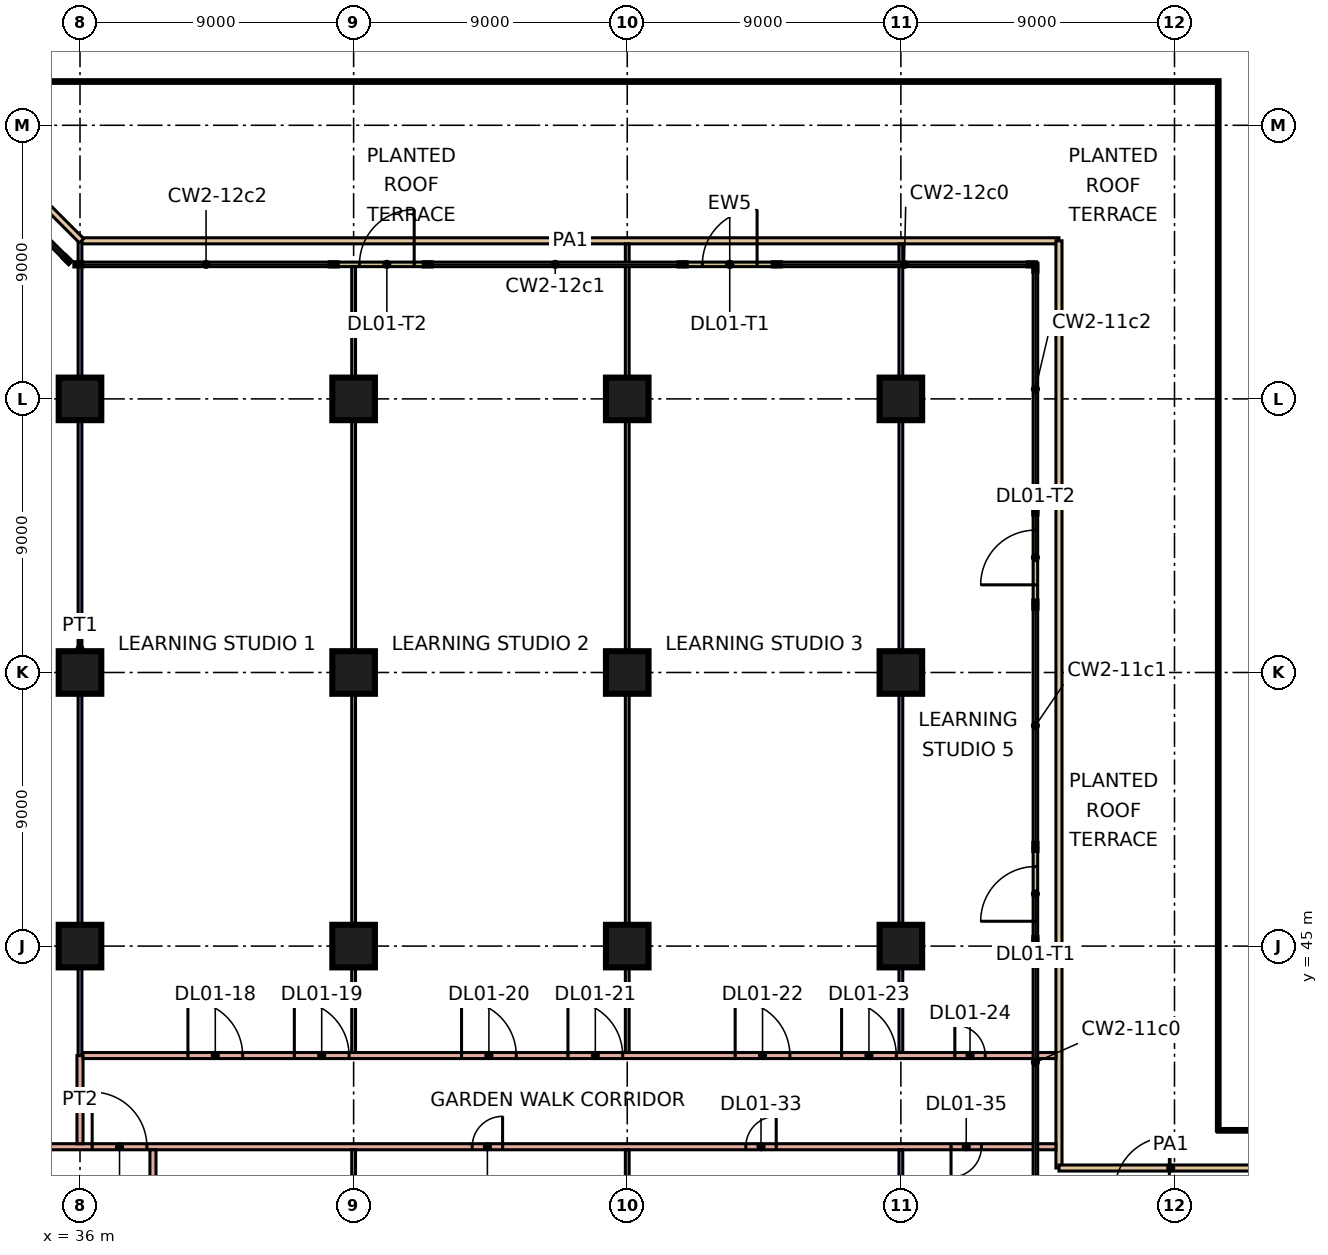
"""IFC4 building model, lengths in metres.
Left out: names, types, materials, properties, quantities, classifications, styles, units other than length and angle.
Written with IfcOpenShell. Run it as: python <this file> out.ifc"""

import sys

from ifc_helpers import new_model, si_unit, direction, frame, frame_2d, origin, origin_2d, place, context, subcontext, project, spatial, rectangle, extrude, element, fill, save


model = new_model("IFC4")
c1 = context("Model", 3, precision=1e-05, world=origin(), true_north=direction((0.0, 1.0)))
c2 = subcontext(c1, "Body", "Model", "MODEL_VIEW")
j1 = project(units=[si_unit("LENGTHUNIT", "METRE"), si_unit("PLANEANGLEUNIT", "RADIAN")], contexts=[c1])
p1 = place(None, origin())
s1 = spatial("IfcSite", under=j1, at=p1, CompositionType="ELEMENT")
p2 = place(p1, origin())
s2 = spatial("IfcBuilding", under=s1, at=p2, CompositionType="ELEMENT")
p3 = place(p2, frame((0.0, 0.0, 7.2)))
s3 = spatial("IfcBuildingStorey", under=s2, at=p3, CompositionType="ELEMENT", Elevation=7.2)
for number, where, z_axis, x_axis in (
    (1, (36.0, 45.0, 0.0), (0.0, 0.0, 1.0), (1.0, 0.0, 0.0)),
    (2, (45.0, 45.0, 0.0), (0.0, 0.0, 1.0), (1.0, 0.0, 0.0)),
    (3, (54.0, 45.0, 0.0), (0.0, 0.0, 1.0), (1.0, 0.0, 0.0)),
    (4, (63.0, 45.0, 0.0), (0.0, 0.0, 1.0), (1.0, 0.0, 0.0)),
    (5, (36.0, 54.0, 0.0), (0.0, 0.0, 1.0), (1.0, 0.0, 0.0)),
    (6, (45.0, 54.0, 0.0), (0.0, 0.0, 1.0), (1.0, 0.0, 0.0)),
    (7, (54.0, 54.0, 0.0), (0.0, 0.0, 1.0), (1.0, 0.0, 0.0)),
    (8, (63.0, 54.0, 0.0), (0.0, 0.0, 1.0), (1.0, 0.0, 0.0)),
    (9, (36.0, 63.0, 0.0), (0.0, 0.0, 1.0), (1.0, 0.0, 0.0)),
    (10, (45.0, 63.0, 0.0), (0.0, 0.0, 1.0), (1.0, 0.0, 0.0)),
    (11, (54.0, 63.0, 0.0), (0.0, 0.0, 1.0), (1.0, 0.0, 0.0)),
    (12, (63.0, 63.0, 0.0), (0.0, 0.0, 1.0), (1.0, 0.0, 0.0)),
):
    element("IfcColumn", number, at=place(p3, frame(where, z_axis=z_axis, x_axis=x_axis)), inside=s3, PredefinedType="COLUMN", context=c2, shape_type="SweptSolid", body=[
        extrude(rectangle(XDim=1.4, YDim=1.4, at=origin_2d()), origin(), (0.0, 0.0, 1.0), 4.8),
    ])
p4 = place(p3, frame((67.425, 45.217, 0.0), z_axis=(0.0, 0.0, 1.0), x_axis=(0.0, 1.0, 0.0)))
e13 = element("IfcWall", 13, at=p4, inside=s3, PredefinedType="SOLIDWALL", context=c2, shape_type="SweptSolid", body=[
    extrude(rectangle(XDim=3.0, YDim=0.15, at=frame_2d((1.5, 0.0))), origin(), (0.0, 0.0, 1.0), 4.4),
])
p5 = place(p4, frame((0.6, 0.0, 0.0)))
e14 = element("IfcOpeningElement", 14, at=p5, cuts=e13, PredefinedType="OPENING", context=c2, shape_type="SweptSolid", body=[
    extrude(rectangle(XDim=1.8, YDim=2.4, at=frame_2d((0.9, 1.2))), frame((0.0, 0.085, 0.0), z_axis=(0.0, -1.0, 0.0), x_axis=(1.0, 0.0, 0.0)), (0.0, 0.0, 1.0), 0.17),
])
p6 = place(p3, frame((67.425, 56.283, 0.0), z_axis=(0.0, 0.0, 1.0), x_axis=(0.0, 1.0, 0.0)))
e15 = element("IfcWall", 15, at=p6, inside=s3, PredefinedType="SOLIDWALL", context=c2, shape_type="SweptSolid", body=[
    extrude(rectangle(XDim=3.0, YDim=0.15, at=frame_2d((1.5, 0.0))), origin(), (0.0, 0.0, 1.0), 4.4),
])
p7 = place(p6, frame((0.6, 0.0, 0.0)))
e16 = element("IfcOpeningElement", 16, at=p7, cuts=e15, PredefinedType="OPENING", context=c2, shape_type="SweptSolid", body=[
    extrude(rectangle(XDim=1.8, YDim=2.4, at=frame_2d((0.9, 1.2))), frame((0.0, 0.085, 0.0), z_axis=(0.0, -1.0, 0.0), x_axis=(1.0, 0.0, 0.0)), (0.0, 0.0, 1.0), 0.17),
])
p8 = place(p3, frame((58.871, 67.425, 0.0), z_axis=(0.0, 0.0, 1.0), x_axis=(-1.0, 0.0, 0.0)))
e17 = element("IfcWall", 17, at=p8, inside=s3, PredefinedType="SOLIDWALL", context=c2, shape_type="SweptSolid", body=[
    extrude(rectangle(XDim=3.0, YDim=0.15, at=frame_2d((1.5, 0.0))), origin(), (0.0, 0.0, 1.0), 4.4),
])
p9 = place(p8, frame((0.6, 0.0, 0.0)))
e18 = element("IfcOpeningElement", 18, at=p9, cuts=e17, PredefinedType="OPENING", context=c2, shape_type="SweptSolid", body=[
    extrude(rectangle(XDim=1.8, YDim=2.4, at=frame_2d((0.9, 1.2))), frame((0.0, 0.085, 0.0), z_axis=(0.0, -1.0, 0.0), x_axis=(1.0, 0.0, 0.0)), (0.0, 0.0, 1.0), 0.17),
])
p10 = place(p3, frame((47.392, 67.425, 0.0), z_axis=(0.0, 0.0, 1.0), x_axis=(-1.0, 0.0, 0.0)))
e19 = element("IfcWall", 19, at=p10, inside=s3, PredefinedType="SOLIDWALL", context=c2, shape_type="SweptSolid", body=[
    extrude(rectangle(XDim=3.0, YDim=0.15, at=frame_2d((1.5, 0.0))), origin(), (0.0, 0.0, 1.0), 4.4),
])
p11 = place(p10, frame((0.4, 0.0, 0.0)))
e20 = element("IfcOpeningElement", 20, at=p11, cuts=e19, PredefinedType="OPENING", context=c2, shape_type="SweptSolid", body=[
    extrude(rectangle(XDim=1.8, YDim=2.4, at=frame_2d((0.9, 1.2))), frame((0.0, 0.085, 0.0), z_axis=(0.0, -1.0, 0.0), x_axis=(1.0, 0.0, 0.0)), (0.0, 0.0, 1.0), 0.17),
])
p12 = place(p3, frame((36.053, 68.2, 0.0), z_axis=(0.0, 0.0, 1.0), x_axis=(1.0, 0.0, 0.0)))
e21 = element("IfcWall", 21, at=p12, inside=s3, PredefinedType="PARAPET", context=c2, shape_type="SweptSolid", body=[
    extrude(rectangle(XDim=32.146, YDim=0.2, at=frame_2d((16.073, 0.0))), origin(), (0.0, 0.0, 1.0), 0.5),
])
p13 = place(p3, frame((68.2, 68.2, 0.0), z_axis=(0.0, 0.0, 1.0), x_axis=(0.0, -1.0, 0.0)))
e22 = element("IfcWall", 22, at=p13, inside=s3, PredefinedType="PARAPET", context=c2, shape_type="SweptSolid", body=[
    extrude(rectangle(XDim=30.5, YDim=0.2, at=frame_2d((15.25, 0.0))), origin(), (0.0, 0.0, 1.0), 0.5),
])
p14 = place(p3, frame((68.2, 37.7, 0.0), z_axis=(0.0, 0.0, 1.0), x_axis=(1.0, 0.0, 0.0)))
e23 = element("IfcWall", 23, at=p14, inside=s3, PredefinedType="PARAPET", context=c2, shape_type="SweptSolid", body=[
    extrude(rectangle(XDim=7.354, YDim=0.2, at=frame_2d((3.677, 0.0))), origin(), (0.0, 0.0, 1.0), 0.5),
])
p15 = place(p3, frame((27.553, 76.7, 0.0), z_axis=(0.0, 0.0, 1.0), x_axis=(0.707106781187, -0.707106781187, 0.0)))
e24 = element("IfcWall", 24, at=p15, inside=s3, PredefinedType="PARAPET", context=c2, shape_type="SweptSolid", body=[
    extrude(rectangle(XDim=12.021, YDim=0.2, at=frame_2d((6.01, 0.0))), origin(), (0.0, 0.0, 1.0), 0.5),
])
p16 = place(p3, frame((27.0, 38.4, 0.0), z_axis=(0.0, 0.0, 1.0), x_axis=(1.0, 0.0, 0.0)))
e25 = element("IfcWall", 25, at=p16, inside=s3, PredefinedType="PARTITIONING", context=c2, shape_type="SweptSolid", body=[
    extrude(rectangle(XDim=41.1, YDim=0.2, at=frame_2d((20.55, 0.0))), origin(), (0.0, 0.0, 1.0), 4.4),
])
p17 = place(p16, frame((21.9, 0.0, 0.0)))
e26 = element("IfcOpeningElement", 26, at=p17, cuts=e25, PredefinedType="OPENING", context=c2, shape_type="SweptSolid", body=[
    extrude(rectangle(XDim=1.0, YDim=2.1, at=frame_2d((0.5, 1.05))), frame((0.0, 0.11, 0.0), z_axis=(0.0, -1.0, 0.0), x_axis=(1.0, 0.0, 0.0)), (0.0, 0.0, 1.0), 0.22),
])
p18 = place(p16, frame((30.9, 0.0, 0.0)))
e27 = element("IfcOpeningElement", 27, at=p18, cuts=e25, PredefinedType="OPENING", context=c2, shape_type="SweptSolid", body=[
    extrude(rectangle(XDim=1.0, YDim=2.1, at=frame_2d((0.5, 1.05))), frame((0.0, 0.11, 0.0), z_axis=(0.0, -1.0, 0.0), x_axis=(1.0, 0.0, 0.0)), (0.0, 0.0, 1.0), 0.22),
])
p19 = place(p16, frame((37.65, 0.0, 0.0)))
e28 = element("IfcOpeningElement", 28, at=p19, cuts=e25, PredefinedType="OPENING", context=c2, shape_type="SweptSolid", body=[
    extrude(rectangle(XDim=1.0, YDim=2.1, at=frame_2d((0.5, 1.05))), frame((0.0, 0.11, 0.0), z_axis=(0.0, -1.0, 0.0), x_axis=(1.0, 0.0, 0.0)), (0.0, 0.0, 1.0), 0.22),
])
p20 = place(p16, frame((9.4, 0.0, 0.0)))
e29 = element("IfcOpeningElement", 29, at=p20, cuts=e25, PredefinedType="OPENING", context=c2, shape_type="SweptSolid", body=[
    extrude(rectangle(XDim=1.8, YDim=2.1, at=frame_2d((0.9, 1.05))), frame((0.0, 0.11, 0.0), z_axis=(0.0, -1.0, 0.0), x_axis=(1.0, 0.0, 0.0)), (0.0, 0.0, 1.0), 0.22),
])
p21 = place(p3, frame((36.0, 38.5, 0.0), z_axis=(0.0, 0.0, 1.0), x_axis=(0.0, 1.0, 0.0)))
e30 = element("IfcWall", 30, at=p21, inside=s3, PredefinedType="PARTITIONING", context=c2, shape_type="SweptSolid", body=[
    extrude(rectangle(XDim=2.9, YDim=0.2, at=frame_2d((1.45, 0.0))), origin(), (0.0, 0.0, 1.0), 4.4),
])
p22 = place(p3, frame((36.0, 41.4, 0.0), z_axis=(0.0, 0.0, 1.0), x_axis=(0.0, 1.0, 0.0)))
e31 = element("IfcWall", 31, at=p22, inside=s3, PredefinedType="PARTITIONING", context=c2, shape_type="SweptSolid", body=[
    extrude(rectangle(XDim=26.747, YDim=0.125, at=frame_2d((13.373, 0.0))), origin(), (0.0, 0.0, 1.0), 4.4),
])
p23 = place(p3, frame((36.1, 41.4, 0.0), z_axis=(0.0, 0.0, 1.0), x_axis=(1.0, 0.0, 0.0)))
e32 = element("IfcWall", 32, at=p23, inside=s3, PredefinedType="PARTITIONING", context=c2, shape_type="SweptSolid", body=[
    extrude(rectangle(XDim=32.0, YDim=0.2, at=frame_2d((16.0, 0.0))), origin(), (0.0, 0.0, 1.0), 4.4),
])
p24 = place(p23, frame((3.45, 0.0, 0.0)))
e33 = element("IfcOpeningElement", 33, at=p24, cuts=e32, PredefinedType="OPENING", context=c2, shape_type="SweptSolid", body=[
    extrude(rectangle(XDim=1.8, YDim=2.1, at=frame_2d((0.9, 1.05))), frame((0.0, 0.11, 0.0), z_axis=(0.0, -1.0, 0.0), x_axis=(1.0, 0.0, 0.0)), (0.0, 0.0, 1.0), 0.22),
])
p25 = place(p23, frame((6.95, 0.0, 0.0)))
e34 = element("IfcOpeningElement", 34, at=p25, cuts=e32, PredefinedType="OPENING", context=c2, shape_type="SweptSolid", body=[
    extrude(rectangle(XDim=1.8, YDim=2.1, at=frame_2d((0.9, 1.05))), frame((0.0, 0.11, 0.0), z_axis=(0.0, -1.0, 0.0), x_axis=(1.0, 0.0, 0.0)), (0.0, 0.0, 1.0), 0.22),
])
p26 = place(p23, frame((12.45, 0.0, 0.0)))
e35 = element("IfcOpeningElement", 35, at=p26, cuts=e32, PredefinedType="OPENING", context=c2, shape_type="SweptSolid", body=[
    extrude(rectangle(XDim=1.8, YDim=2.1, at=frame_2d((0.9, 1.05))), frame((0.0, 0.11, 0.0), z_axis=(0.0, -1.0, 0.0), x_axis=(1.0, 0.0, 0.0)), (0.0, 0.0, 1.0), 0.22),
])
p27 = place(p23, frame((15.95, 0.0, 0.0)))
e36 = element("IfcOpeningElement", 36, at=p27, cuts=e32, PredefinedType="OPENING", context=c2, shape_type="SweptSolid", body=[
    extrude(rectangle(XDim=1.8, YDim=2.1, at=frame_2d((0.9, 1.05))), frame((0.0, 0.11, 0.0), z_axis=(0.0, -1.0, 0.0), x_axis=(1.0, 0.0, 0.0)), (0.0, 0.0, 1.0), 0.22),
])
p28 = place(p23, frame((21.45, 0.0, 0.0)))
e37 = element("IfcOpeningElement", 37, at=p28, cuts=e32, PredefinedType="OPENING", context=c2, shape_type="SweptSolid", body=[
    extrude(rectangle(XDim=1.8, YDim=2.1, at=frame_2d((0.9, 1.05))), frame((0.0, 0.11, 0.0), z_axis=(0.0, -1.0, 0.0), x_axis=(1.0, 0.0, 0.0)), (0.0, 0.0, 1.0), 0.22),
])
p29 = place(p23, frame((24.95, 0.0, 0.0)))
e38 = element("IfcOpeningElement", 38, at=p29, cuts=e32, PredefinedType="OPENING", context=c2, shape_type="SweptSolid", body=[
    extrude(rectangle(XDim=1.8, YDim=2.1, at=frame_2d((0.9, 1.05))), frame((0.0, 0.11, 0.0), z_axis=(0.0, -1.0, 0.0), x_axis=(1.0, 0.0, 0.0)), (0.0, 0.0, 1.0), 0.22),
])
p30 = place(p23, frame((28.675, 0.0, 0.0)))
e39 = element("IfcOpeningElement", 39, at=p30, cuts=e32, PredefinedType="OPENING", context=c2, shape_type="SweptSolid", body=[
    extrude(rectangle(XDim=1.0, YDim=2.1, at=frame_2d((0.5, 1.05))), frame((0.0, 0.11, 0.0), z_axis=(0.0, -1.0, 0.0), x_axis=(1.0, 0.0, 0.0)), (0.0, 0.0, 1.0), 0.22),
])
p31 = place(p3, frame((38.4, 27.2, 0.0), z_axis=(0.0, 0.0, 1.0), x_axis=(0.0, 1.0, 0.0)))
e40 = element("IfcWall", 40, at=p31, inside=s3, PredefinedType="PARTITIONING", context=c2, shape_type="SweptSolid", body=[
    extrude(rectangle(XDim=11.1, YDim=0.2, at=frame_2d((5.55, 0.0))), origin(), (0.0, 0.0, 1.0), 4.4),
])
p32 = place(p31, frame((3.8, 0.0, 0.0)))
e41 = element("IfcOpeningElement", 41, at=p32, cuts=e40, PredefinedType="OPENING", context=c2, shape_type="SweptSolid", body=[
    extrude(rectangle(XDim=1.0, YDim=2.1, at=frame_2d((0.5, 1.05))), frame((0.0, 0.11, 0.0), z_axis=(0.0, -1.0, 0.0), x_axis=(1.0, 0.0, 0.0)), (0.0, 0.0, 1.0), 0.22),
])
p33 = place(p3, frame((45.0, 27.2, 0.0), z_axis=(0.0, 0.0, 1.0), x_axis=(0.0, 1.0, 0.0)))
e42 = element("IfcWall", 42, at=p33, inside=s3, PredefinedType="PARTITIONING", context=c2, shape_type="SweptSolid", body=[
    extrude(rectangle(XDim=11.1, YDim=0.125, at=frame_2d((5.55, 0.0))), origin(), (0.0, 0.0, 1.0), 4.4),
])
p34 = place(p3, frame((45.0, 41.5, 0.0), z_axis=(0.0, 0.0, 1.0), x_axis=(0.0, 1.0, 0.0)))
e43 = element("IfcWall", 43, at=p34, inside=s3, PredefinedType="PARTITIONING", context=c2, shape_type="SweptSolid", body=[
    extrude(rectangle(XDim=25.851, YDim=0.125, at=frame_2d((12.926, 0.0))), origin(), (0.0, 0.0, 1.0), 4.4),
])
p35 = place(p3, frame((54.0, 27.2, 0.0), z_axis=(0.0, 0.0, 1.0), x_axis=(0.0, 1.0, 0.0)))
e44 = element("IfcWall", 44, at=p35, inside=s3, PredefinedType="PARTITIONING", context=c2, shape_type="SweptSolid", body=[
    extrude(rectangle(XDim=11.1, YDim=0.125, at=frame_2d((5.55, 0.0))), origin(), (0.0, 0.0, 1.0), 4.4),
])
p36 = place(p3, frame((54.0, 41.5, 0.0), z_axis=(0.0, 0.0, 1.0), x_axis=(0.0, 1.0, 0.0)))
e45 = element("IfcWall", 45, at=p36, inside=s3, PredefinedType="PARTITIONING", context=c2, shape_type="SweptSolid", body=[
    extrude(rectangle(XDim=26.6, YDim=0.125, at=frame_2d((13.3, 0.0))), origin(), (0.0, 0.0, 1.0), 4.4),
])
p37 = place(p3, frame((63.0, 27.2, 0.0), z_axis=(0.0, 0.0, 1.0), x_axis=(0.0, 1.0, 0.0)))
e46 = element("IfcWall", 46, at=p37, inside=s3, PredefinedType="PARTITIONING", context=c2, shape_type="SweptSolid", body=[
    extrude(rectangle(XDim=11.1, YDim=0.125, at=frame_2d((5.55, 0.0))), origin(), (0.0, 0.0, 1.0), 4.4),
])
p38 = place(p3, frame((63.0, 41.5, 0.0), z_axis=(0.0, 0.0, 1.0), x_axis=(0.0, 1.0, 0.0)))
e47 = element("IfcWall", 47, at=p38, inside=s3, PredefinedType="PARTITIONING", context=c2, shape_type="SweptSolid", body=[
    extrude(rectangle(XDim=26.6, YDim=0.125, at=frame_2d((13.3, 0.0))), origin(), (0.0, 0.0, 1.0), 4.4),
])
p39 = place(p5, origin())
e48 = element("IfcDoor", 48, at=p39, inside=s3, OperationType="DOUBLE_DOOR_SINGLE_SWING", PredefinedType="DOOR", context=c2, shape_type="SweptSolid", body=[
    extrude(rectangle(XDim=1.8, YDim=2.4, at=frame_2d((0.9, 1.2))), frame((0.0, 0.025, 0.0), z_axis=(0.0, -1.0, 0.0), x_axis=(1.0, 0.0, 0.0)), (0.0, 0.0, 1.0), 0.05),
])
fill(e14, e48)
p40 = place(p7, origin())
e49 = element("IfcDoor", 49, at=p40, inside=s3, OperationType="DOUBLE_DOOR_SINGLE_SWING", PredefinedType="DOOR", context=c2, shape_type="SweptSolid", body=[
    extrude(rectangle(XDim=1.8, YDim=2.4, at=frame_2d((0.9, 1.2))), frame((0.0, 0.025, 0.0), z_axis=(0.0, -1.0, 0.0), x_axis=(1.0, 0.0, 0.0)), (0.0, 0.0, 1.0), 0.05),
])
fill(e16, e49)
p41 = place(p9, frame((1.8, 0.0, 0.0), z_axis=(0.0, 0.0, 1.0), x_axis=(-1.0, 0.0, 0.0)))
e50 = element("IfcDoor", 50, at=p41, inside=s3, OperationType="DOUBLE_DOOR_SINGLE_SWING", PredefinedType="DOOR", context=c2, shape_type="SweptSolid", body=[
    extrude(rectangle(XDim=1.8, YDim=2.4, at=frame_2d((0.9, 1.2))), frame((0.0, 0.025, 0.0), z_axis=(0.0, -1.0, 0.0), x_axis=(1.0, 0.0, 0.0)), (0.0, 0.0, 1.0), 0.05),
])
fill(e18, e50)
p42 = place(p11, frame((1.8, 0.0, 0.0), z_axis=(0.0, 0.0, 1.0), x_axis=(-1.0, 0.0, 0.0)))
e51 = element("IfcDoor", 51, at=p42, inside=s3, OperationType="DOUBLE_DOOR_SINGLE_SWING", PredefinedType="DOOR", context=c2, shape_type="SweptSolid", body=[
    extrude(rectangle(XDim=1.8, YDim=2.4, at=frame_2d((0.9, 1.2))), frame((0.0, 0.025, 0.0), z_axis=(0.0, -1.0, 0.0), x_axis=(1.0, 0.0, 0.0)), (0.0, 0.0, 1.0), 0.05),
])
fill(e20, e51)
p43 = place(p24, origin())
e52 = element("IfcDoor", 52, at=p43, inside=s3, OperationType="DOUBLE_DOOR_SINGLE_SWING", PredefinedType="DOOR", context=c2, shape_type="SweptSolid", body=[
    extrude(rectangle(XDim=1.8, YDim=2.1, at=frame_2d((0.9, 1.05))), frame((0.0, 0.025, 0.0), z_axis=(0.0, -1.0, 0.0), x_axis=(1.0, 0.0, 0.0)), (0.0, 0.0, 1.0), 0.05),
])
fill(e33, e52)
p44 = place(p25, origin())
e53 = element("IfcDoor", 53, at=p44, inside=s3, OperationType="DOUBLE_DOOR_SINGLE_SWING", PredefinedType="DOOR", context=c2, shape_type="SweptSolid", body=[
    extrude(rectangle(XDim=1.8, YDim=2.1, at=frame_2d((0.9, 1.05))), frame((0.0, 0.025, 0.0), z_axis=(0.0, -1.0, 0.0), x_axis=(1.0, 0.0, 0.0)), (0.0, 0.0, 1.0), 0.05),
])
fill(e34, e53)
p45 = place(p26, origin())
e54 = element("IfcDoor", 54, at=p45, inside=s3, OperationType="DOUBLE_DOOR_SINGLE_SWING", PredefinedType="DOOR", context=c2, shape_type="SweptSolid", body=[
    extrude(rectangle(XDim=1.8, YDim=2.1, at=frame_2d((0.9, 1.05))), frame((0.0, 0.025, 0.0), z_axis=(0.0, -1.0, 0.0), x_axis=(1.0, 0.0, 0.0)), (0.0, 0.0, 1.0), 0.05),
])
fill(e35, e54)
p46 = place(p27, origin())
e55 = element("IfcDoor", 55, at=p46, inside=s3, OperationType="DOUBLE_DOOR_SINGLE_SWING", PredefinedType="DOOR", context=c2, shape_type="SweptSolid", body=[
    extrude(rectangle(XDim=1.8, YDim=2.1, at=frame_2d((0.9, 1.05))), frame((0.0, 0.025, 0.0), z_axis=(0.0, -1.0, 0.0), x_axis=(1.0, 0.0, 0.0)), (0.0, 0.0, 1.0), 0.05),
])
fill(e36, e55)
p47 = place(p28, origin())
e56 = element("IfcDoor", 56, at=p47, inside=s3, OperationType="DOUBLE_DOOR_SINGLE_SWING", PredefinedType="DOOR", context=c2, shape_type="SweptSolid", body=[
    extrude(rectangle(XDim=1.8, YDim=2.1, at=frame_2d((0.9, 1.05))), frame((0.0, 0.025, 0.0), z_axis=(0.0, -1.0, 0.0), x_axis=(1.0, 0.0, 0.0)), (0.0, 0.0, 1.0), 0.05),
])
fill(e37, e56)
p48 = place(p29, origin())
e57 = element("IfcDoor", 57, at=p48, inside=s3, OperationType="DOUBLE_DOOR_SINGLE_SWING", PredefinedType="DOOR", context=c2, shape_type="SweptSolid", body=[
    extrude(rectangle(XDim=1.8, YDim=2.1, at=frame_2d((0.9, 1.05))), frame((0.0, 0.025, 0.0), z_axis=(0.0, -1.0, 0.0), x_axis=(1.0, 0.0, 0.0)), (0.0, 0.0, 1.0), 0.05),
])
fill(e38, e57)
p49 = place(p30, origin())
e58 = element("IfcDoor", 58, at=p49, inside=s3, OperationType="SINGLE_SWING_LEFT", PredefinedType="DOOR", context=c2, shape_type="SweptSolid", body=[
    extrude(rectangle(XDim=1.0, YDim=2.1, at=frame_2d((0.5, 1.05))), frame((0.0, 0.025, 0.0), z_axis=(0.0, -1.0, 0.0), x_axis=(1.0, 0.0, 0.0)), (0.0, 0.0, 1.0), 0.05),
])
fill(e39, e58)
p50 = place(p17, frame((1.0, 0.0, 0.0), z_axis=(0.0, 0.0, 1.0), x_axis=(-1.0, 0.0, 0.0)))
e59 = element("IfcDoor", 59, at=p50, inside=s3, OperationType="SINGLE_SWING_RIGHT", PredefinedType="DOOR", context=c2, shape_type="SweptSolid", body=[
    extrude(rectangle(XDim=1.0, YDim=2.1, at=frame_2d((0.5, 1.05))), frame((0.0, 0.025, 0.0), z_axis=(0.0, -1.0, 0.0), x_axis=(1.0, 0.0, 0.0)), (0.0, 0.0, 1.0), 0.05),
])
fill(e26, e59)
p51 = place(p18, frame((1.0, 0.0, 0.0), z_axis=(0.0, 0.0, 1.0), x_axis=(-1.0, 0.0, 0.0)))
e60 = element("IfcDoor", 60, at=p51, inside=s3, OperationType="SINGLE_SWING_RIGHT", PredefinedType="DOOR", context=c2, shape_type="SweptSolid", body=[
    extrude(rectangle(XDim=1.0, YDim=2.1, at=frame_2d((0.5, 1.05))), frame((0.0, 0.025, 0.0), z_axis=(0.0, -1.0, 0.0), x_axis=(1.0, 0.0, 0.0)), (0.0, 0.0, 1.0), 0.05),
])
fill(e27, e60)
p52 = place(p19, frame((1.0, 0.0, 0.0), z_axis=(0.0, 0.0, 1.0), x_axis=(-1.0, 0.0, 0.0)))
e61 = element("IfcDoor", 61, at=p52, inside=s3, OperationType="SINGLE_SWING_LEFT", PredefinedType="DOOR", context=c2, shape_type="SweptSolid", body=[
    extrude(rectangle(XDim=1.0, YDim=2.1, at=frame_2d((0.5, 1.05))), frame((0.0, 0.025, 0.0), z_axis=(0.0, -1.0, 0.0), x_axis=(1.0, 0.0, 0.0)), (0.0, 0.0, 1.0), 0.05),
])
fill(e28, e61)
p53 = place(p20, origin())
e62 = element("IfcDoor", 62, at=p53, inside=s3, OperationType="DOUBLE_DOOR_SINGLE_SWING", PredefinedType="DOOR", context=c2, shape_type="SweptSolid", body=[
    extrude(rectangle(XDim=1.8, YDim=2.1, at=frame_2d((0.9, 1.05))), frame((0.0, 0.025, 0.0), z_axis=(0.0, -1.0, 0.0), x_axis=(1.0, 0.0, 0.0)), (0.0, 0.0, 1.0), 0.05),
])
fill(e29, e62)
save(model, sys.argv[1])
